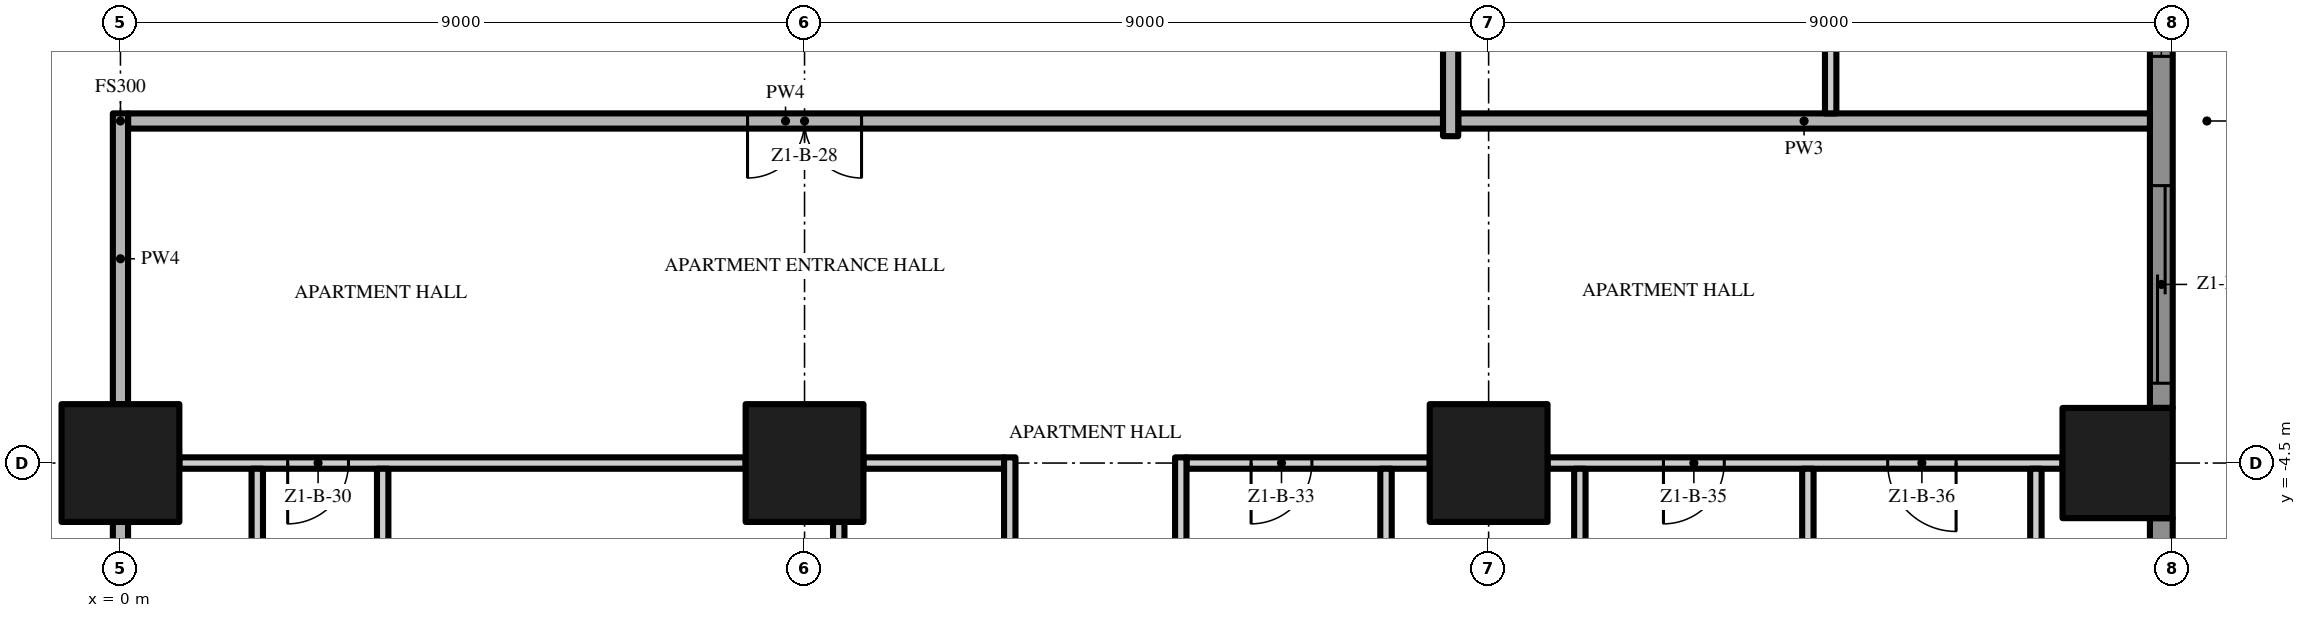
"""IFC4 building model, lengths in metres.
Left out: names, types, materials, properties, quantities, classifications, styles, units other than length and angle.
Written with IfcOpenShell. Run it as: python <this file> out.ifc"""

import sys

from ifc_helpers import new_model, si_unit, direction, frame, frame_2d, origin, origin_2d, place, context, subcontext, project, spatial, polyline, rectangle, outline, extrude, element, fill, save


model = new_model("IFC4")
c1 = context("Model", 3, precision=1e-05, world=origin(), true_north=direction((0.0, 1.0)))
c2 = subcontext(c1, "Body", "Model", "MODEL_VIEW")
j1 = project(units=[si_unit("LENGTHUNIT", "METRE"), si_unit("PLANEANGLEUNIT", "RADIAN")], contexts=[c1])
p1 = place(None, origin())
s1 = spatial("IfcSite", under=j1, at=p1, CompositionType="ELEMENT")
p2 = place(p1, origin())
s2 = spatial("IfcBuilding", under=s1, at=p2, CompositionType="ELEMENT")
p3 = place(p2, frame((0.0, 0.0, 26.4)))
s3 = spatial("IfcBuildingStorey", under=s2, at=p3, CompositionType="ELEMENT", Elevation=26.4)
for number, where, z_axis, x_axis in (
    (1, (0.0, -4.5, 0.0), (0.0, 0.0, 1.0), (1.0, 0.0, 0.0)),
    (2, (18.0, -4.5, 0.0), (0.0, 0.0, 1.0), (1.0, 0.0, 0.0)),
):
    element("IfcColumn", number, at=place(p3, frame(where, z_axis=z_axis, x_axis=x_axis)), inside=s3, PredefinedType="COLUMN", context=c2, shape_type="SweptSolid", body=[
        extrude(rectangle(XDim=1.55, YDim=1.55, at=origin_2d()), origin(), (0.0, 0.0, 1.0), 3.5),
    ])
p4 = place(p3, frame((26.275, -4.5, 0.0), z_axis=(0.0, 0.0, 1.0), x_axis=(1.0, 0.0, 0.0)))
e3 = element("IfcColumn", 3, at=p4, inside=s3, PredefinedType="COLUMN", context=c2, shape_type="SweptSolid", body=[
    extrude(rectangle(XDim=1.45, YDim=1.45, at=origin_2d()), origin(), (0.0, 0.0, 1.0), 3.5),
])
p5 = place(p3, frame((9.0, -4.5, 0.0), z_axis=(0.0, 0.0, 1.0), x_axis=(1.0, 0.0, 0.0)))
e4 = element("IfcColumn", 4, at=p5, inside=s3, PredefinedType="COLUMN", context=c2, shape_type="SweptSolid", body=[
    extrude(rectangle(XDim=1.55, YDim=1.55, at=origin_2d()), origin(), (0.0, 0.0, 1.0), 3.5),
])
p6 = place(p3, frame((26.85, -5.225, 0.0), z_axis=(0.0, 0.0, 1.0), x_axis=(0.0, -1.0, 0.0)))
e5 = element("IfcWall", 5, at=p6, inside=s3, PredefinedType="SOLIDWALL", context=c2, shape_type="SweptSolid", body=[
    extrude(rectangle(XDim=7.55, YDim=0.3, at=frame_2d((3.775, 0.0))), origin(), (0.0, 0.0, 1.0), 3.5),
])
p7 = place(p6, frame((4.625, 0.0, 0.45)))
e6 = element("IfcOpeningElement", 6, at=p7, cuts=e5, PredefinedType="OPENING", context=c2, shape_type="SweptSolid", body=[
    extrude(rectangle(XDim=2.6, YDim=2.65, at=frame_2d((1.3, 1.325))), frame((0.0, 0.16, 0.0), z_axis=(0.0, -1.0, 0.0), x_axis=(1.0, 0.0, 0.0)), (0.0, 0.0, 1.0), 0.32),
])
p8 = place(p6, frame((0.325, 0.0, 0.0)))
e7 = element("IfcOpeningElement", 7, at=p8, cuts=e5, PredefinedType="OPENING", context=c2, shape_type="SweptSolid", body=[
    extrude(rectangle(XDim=2.6, YDim=2.4, at=frame_2d((1.3, 1.2))), frame((0.0, 0.16, 0.0), z_axis=(0.0, -1.0, 0.0), x_axis=(1.0, 0.0, 0.0)), (0.0, 0.0, 1.0), 0.32),
])
p9 = place(p3, frame((26.85, 3.775, 0.0), z_axis=(0.0, 0.0, 1.0), x_axis=(0.0, -1.0, 0.0)))
e8 = element("IfcWall", 8, at=p9, inside=s3, PredefinedType="SOLIDWALL", context=c2, shape_type="SweptSolid", body=[
    extrude(rectangle(XDim=7.55, YDim=0.3, at=frame_2d((3.775, 0.0))), origin(), (0.0, 0.0, 1.0), 3.5),
])
p10 = place(p9, frame((4.625, 0.0, 0.0)))
e9 = element("IfcOpeningElement", 9, at=p10, cuts=e8, PredefinedType="OPENING", context=c2, shape_type="SweptSolid", body=[
    extrude(rectangle(XDim=2.6, YDim=2.4, at=frame_2d((1.3, 1.2))), frame((0.0, 0.16, 0.0), z_axis=(0.0, -1.0, 0.0), x_axis=(1.0, 0.0, 0.0)), (0.0, 0.0, 1.0), 0.32),
])
p11 = place(p9, frame((0.325, 0.0, 0.45)))
e10 = element("IfcOpeningElement", 10, at=p11, cuts=e8, PredefinedType="OPENING", context=c2, shape_type="SweptSolid", body=[
    extrude(rectangle(XDim=2.6, YDim=2.65, at=frame_2d((1.3, 1.325))), frame((0.0, 0.16, 0.0), z_axis=(0.0, -1.0, 0.0), x_axis=(1.0, 0.0, 0.0)), (0.0, 0.0, 1.0), 0.32),
])
p12 = place(p3, origin())
e11 = element("IfcWall", 11, at=p12, inside=s3, PredefinedType="USERDEFINED", context=c2, shape_type="SweptSolid", body=[
    extrude(outline(polyline([(29.649, -18.0), (28.988, -16.5), (28.255, -15.0), (27.731, -13.5), (27.6, -12.375), (27.615, -12.0), (27.951, -10.5), (28.612, -9.0), (29.345, -7.5), (29.869, -6.0), (30.0, -4.875), (29.985, -4.5), (29.649, -3.0), (28.988, -1.5), (28.255, 0.0), (27.731, 1.5), (27.6, 2.625), (27.615, 3.0), (27.951, 4.5), (28.612, 6.0), (29.345, 7.5), (29.869, 9.0), (30.0, 10.125), (29.985, 10.5), (29.649, 12.0), (28.988, 13.5), (28.255, 15.0), (27.731, 16.5), (27.6, 17.625), (27.615, 18.0), (27.365, 18.01), (27.349, 17.615), (27.486, 16.444), (28.024, 14.904), (28.761, 13.395), (29.41, 11.921), (29.736, 10.467), (29.749, 10.135), (29.624, 9.056), (29.114, 7.596), (28.385, 6.105), (27.713, 4.579), (27.366, 3.033), (27.349, 2.615), (27.486, 1.444), (28.024, -0.096), (28.761, -1.605), (29.41, -3.079), (29.736, -4.533), (29.749, -4.865), (29.624, -5.944), (29.114, -7.404), (28.385, -8.895), (27.713, -10.421), (27.366, -11.967), (27.349, -12.385), (27.486, -13.556), (28.024, -15.096), (28.761, -16.605), (29.42, -18.101), (29.649, -18.0)])), origin(), (0.0, 0.0, 1.0), 0.9),
])
p13 = place(p3, frame((8.225, -4.5, 0.0), z_axis=(0.0, 0.0, 1.0), x_axis=(-1.0, 0.0, 0.0)))
e12 = element("IfcWall", 12, at=p13, inside=s3, PredefinedType="PARTITIONING", context=c2, shape_type="SweptSolid", body=[
    extrude(rectangle(XDim=7.45, YDim=0.15, at=frame_2d((3.725, 0.0))), origin(), (0.0, 0.0, 1.0), 3.5),
])
p14 = place(p13, frame((5.225, 0.0, 0.0)))
e13 = element("IfcOpeningElement", 13, at=p14, cuts=e12, PredefinedType="OPENING", context=c2, shape_type="SweptSolid", body=[
    extrude(rectangle(XDim=0.8, YDim=2.0, at=frame_2d((0.4, 1.0))), frame((0.0, 0.085, 0.0), z_axis=(0.0, -1.0, 0.0), x_axis=(1.0, 0.0, 0.0)), (0.0, 0.0, 1.0), 0.17),
])
p15 = place(p3, frame((9.775, -4.5, 0.0), z_axis=(0.0, 0.0, 1.0), x_axis=(1.0, 0.0, 0.0)))
e14 = element("IfcWall", 14, at=p15, inside=s3, PredefinedType="PARTITIONING", context=c2, shape_type="SweptSolid", body=[
    extrude(rectangle(XDim=1.85, YDim=0.15, at=frame_2d((0.925, 0.0))), origin(), (0.0, 0.0, 1.0), 3.5),
])
p16 = place(p3, frame((17.225, -4.5, 0.0), z_axis=(0.0, 0.0, 1.0), x_axis=(-1.0, 0.0, 0.0)))
e15 = element("IfcWall", 15, at=p16, inside=s3, PredefinedType="PARTITIONING", context=c2, shape_type="SweptSolid", body=[
    extrude(rectangle(XDim=3.2, YDim=0.15, at=frame_2d((1.6, 0.0))), origin(), (0.0, 0.0, 1.0), 3.5),
])
p17 = place(p16, frame((1.55, 0.0, 0.0)))
e16 = element("IfcOpeningElement", 16, at=p17, cuts=e15, PredefinedType="OPENING", context=c2, shape_type="SweptSolid", body=[
    extrude(rectangle(XDim=0.8, YDim=2.0, at=frame_2d((0.4, 1.0))), frame((0.0, 0.085, 0.0), z_axis=(0.0, -1.0, 0.0), x_axis=(1.0, 0.0, 0.0)), (0.0, 0.0, 1.0), 0.17),
])
p18 = place(p3, frame((25.55, -4.5, 0.0), z_axis=(0.0, 0.0, 1.0), x_axis=(-1.0, 0.0, 0.0)))
e17 = element("IfcWall", 17, at=p18, inside=s3, PredefinedType="PARTITIONING", context=c2, shape_type="SweptSolid", body=[
    extrude(rectangle(XDim=6.775, YDim=0.15, at=frame_2d((3.388, 0.0))), origin(), (0.0, 0.0, 1.0), 3.5),
])
p19 = place(p18, frame((4.45, 0.0, 0.0)))
e18 = element("IfcOpeningElement", 18, at=p19, cuts=e17, PredefinedType="OPENING", context=c2, shape_type="SweptSolid", body=[
    extrude(rectangle(XDim=0.8, YDim=2.0, at=frame_2d((0.4, 1.0))), frame((0.0, 0.085, 0.0), z_axis=(0.0, -1.0, 0.0), x_axis=(1.0, 0.0, 0.0)), (0.0, 0.0, 1.0), 0.17),
])
p20 = place(p18, frame((1.4, 0.0, 0.0)))
e19 = element("IfcOpeningElement", 19, at=p20, cuts=e17, PredefinedType="OPENING", context=c2, shape_type="SweptSolid", body=[
    extrude(rectangle(XDim=0.9, YDim=2.1, at=frame_2d((0.45, 1.05))), frame((0.0, 0.085, 0.0), z_axis=(0.0, -1.0, 0.0), x_axis=(1.0, 0.0, 0.0)), (0.0, 0.0, 1.0), 0.17),
])
p21 = place(p3, frame((17.4, 0.0, 0.0), z_axis=(0.0, 0.0, 1.0), x_axis=(-1.0, 0.0, 0.0)))
e20 = element("IfcWall", 20, at=p21, inside=s3, PredefinedType="PARTITIONING", context=c2, shape_type="SweptSolid", body=[
    extrude(rectangle(XDim=17.3, YDim=0.2, at=frame_2d((8.65, 0.0))), origin(), (0.0, 0.0, 1.0), 3.5),
])
p22 = place(p21, frame((7.65, 0.0, 0.0)))
e21 = element("IfcOpeningElement", 21, at=p22, cuts=e20, PredefinedType="OPENING", context=c2, shape_type="SweptSolid", body=[
    extrude(rectangle(XDim=1.5, YDim=2.4, at=frame_2d((0.75, 1.2))), frame((0.0, 0.11, 0.0), z_axis=(0.0, -1.0, 0.0), x_axis=(1.0, 0.0, 0.0)), (0.0, 0.0, 1.0), 0.22),
])
p23 = place(p3, frame((17.6, 0.0, 0.0), z_axis=(0.0, 0.0, 1.0), x_axis=(1.0, 0.0, 0.0)))
e22 = element("IfcWall", 22, at=p23, inside=s3, PredefinedType="PARTITIONING", context=c2, shape_type="SweptSolid", body=[
    extrude(rectangle(XDim=9.1, YDim=0.2, at=frame_2d((4.55, 0.0))), origin(), (0.0, 0.0, 1.0), 3.5),
])
p24 = place(p3, frame((0.0, -12.725, 0.0), z_axis=(0.0, 0.0, 1.0), x_axis=(0.0, 1.0, 0.0)))
e23 = element("IfcWall", 23, at=p24, inside=s3, PredefinedType="PARTITIONING", context=c2, shape_type="SweptSolid", body=[
    extrude(rectangle(XDim=7.45, YDim=0.2, at=frame_2d((3.725, 0.0))), origin(), (0.0, 0.0, 1.0), 3.5),
])
p25 = place(p3, frame((0.0, -3.725, 0.0), z_axis=(0.0, 0.0, 1.0), x_axis=(0.0, 1.0, 0.0)))
e24 = element("IfcWall", 24, at=p25, inside=s3, PredefinedType="PARTITIONING", context=c2, shape_type="SweptSolid", body=[
    extrude(rectangle(XDim=3.825, YDim=0.2, at=frame_2d((1.913, 0.0))), origin(), (0.0, 0.0, 1.0), 3.5),
])
for number, where, z_axis, x_axis in (
    (25, (1.8, -8.925, 0.0), (0.0, 0.0, 1.0), (0.0, 1.0, 0.0)),
    (26, (3.45, -8.925, 0.0), (0.0, 0.0, 1.0), (0.0, 1.0, 0.0)),
):
    element("IfcWall", number, at=place(p3, frame(where, z_axis=z_axis, x_axis=x_axis)), inside=s3, PredefinedType="PARTITIONING", context=c2, shape_type="SweptSolid", body=[
        extrude(rectangle(XDim=4.35, YDim=0.15, at=frame_2d((2.175, 0.0))), origin(), (0.0, 0.0, 1.0), 3.5),
    ])
p26 = place(p3, frame((9.45, -8.925, 0.0), z_axis=(0.0, 0.0, 1.0), x_axis=(0.0, 1.0, 0.0)))
e27 = element("IfcWall", 27, at=p26, inside=s3, PredefinedType="PARTITIONING", context=c2, shape_type="SweptSolid", body=[
    extrude(rectangle(XDim=3.65, YDim=0.15, at=frame_2d((1.825, 0.0))), origin(), (0.0, 0.0, 1.0), 3.5),
])
p27 = place(p3, frame((11.7, -9.075, 0.0), z_axis=(0.0, 0.0, 1.0), x_axis=(0.0, 1.0, 0.0)))
e28 = element("IfcWall", 28, at=p27, inside=s3, PredefinedType="PARTITIONING", context=c2, shape_type="SweptSolid", body=[
    extrude(rectangle(XDim=4.65, YDim=0.15, at=frame_2d((2.325, 0.0))), origin(), (0.0, 0.0, 1.0), 3.5),
])
p28 = place(p27, frame((1.875, 0.0, 0.0)))
e29 = element("IfcOpeningElement", 29, at=p28, cuts=e28, PredefinedType="OPENING", context=c2, shape_type="SweptSolid", body=[
    extrude(rectangle(XDim=0.9, YDim=2.1, at=frame_2d((0.45, 1.05))), frame((0.0, 0.085, 0.0), z_axis=(0.0, -1.0, 0.0), x_axis=(1.0, 0.0, 0.0)), (0.0, 0.0, 1.0), 0.17),
])
p29 = place(p3, frame((13.95, -8.925, 0.0), z_axis=(0.0, 0.0, 1.0), x_axis=(0.0, 1.0, 0.0)))
e30 = element("IfcWall", 30, at=p29, inside=s3, PredefinedType="PARTITIONING", context=c2, shape_type="SweptSolid", body=[
    extrude(rectangle(XDim=4.5, YDim=0.15, at=frame_2d((2.25, 0.0))), origin(), (0.0, 0.0, 1.0), 3.5),
])
p30 = place(p3, frame((16.65, -8.925, 0.0), z_axis=(0.0, 0.0, 1.0), x_axis=(0.0, 1.0, 0.0)))
e31 = element("IfcWall", 31, at=p30, inside=s3, PredefinedType="PARTITIONING", context=c2, shape_type="SweptSolid", body=[
    extrude(rectangle(XDim=4.35, YDim=0.15, at=frame_2d((2.175, 0.0))), origin(), (0.0, 0.0, 1.0), 3.5),
])
p31 = place(p3, frame((17.5, -0.2, 0.0), z_axis=(0.0, 0.0, 1.0), x_axis=(0.0, 1.0, 0.0)))
e32 = element("IfcWall", 32, at=p31, inside=s3, PredefinedType="PARTITIONING", context=c2, shape_type="SweptSolid", body=[
    extrude(rectangle(XDim=3.925, YDim=0.2, at=frame_2d((1.962, 0.0))), origin(), (0.0, 0.0, 1.0), 3.5),
])
for number, where, z_axis, x_axis in (
    (33, (19.2, -8.925, 0.0), (0.0, 0.0, 1.0), (0.0, 1.0, 0.0)),
    (34, (22.2, -8.925, 0.0), (0.0, 0.0, 1.0), (0.0, 1.0, 0.0)),
):
    element("IfcWall", number, at=place(p3, frame(where, z_axis=z_axis, x_axis=x_axis)), inside=s3, PredefinedType="PARTITIONING", context=c2, shape_type="SweptSolid", body=[
        extrude(rectangle(XDim=4.35, YDim=0.15, at=frame_2d((2.175, 0.0))), origin(), (0.0, 0.0, 1.0), 3.5),
    ])
p32 = place(p3, frame((22.5, 17.275, 0.0), z_axis=(0.0, 0.0, 1.0), x_axis=(0.0, -1.0, 0.0)))
e35 = element("IfcWall", 35, at=p32, inside=s3, PredefinedType="PARTITIONING", context=c2, shape_type="SweptSolid", body=[
    extrude(rectangle(XDim=17.175, YDim=0.15, at=frame_2d((8.588, 0.0))), origin(), (0.0, 0.0, 1.0), 3.5),
])
p33 = place(p32, frame((14.525, 0.0, 0.0)))
e36 = element("IfcOpeningElement", 36, at=p33, cuts=e35, PredefinedType="OPENING", context=c2, shape_type="SweptSolid", body=[
    extrude(rectangle(XDim=1.0, YDim=2.4, at=frame_2d((0.5, 1.2))), frame((0.0, 0.085, 0.0), z_axis=(0.0, -1.0, 0.0), x_axis=(1.0, 0.0, 0.0)), (0.0, 0.0, 1.0), 0.17),
])
p34 = place(p32, frame((8.925, 0.0, 0.0)))
e37 = element("IfcOpeningElement", 37, at=p34, cuts=e35, PredefinedType="OPENING", context=c2, shape_type="SweptSolid", body=[
    extrude(rectangle(XDim=1.0, YDim=2.4, at=frame_2d((0.5, 1.2))), frame((0.0, 0.085, 0.0), z_axis=(0.0, -1.0, 0.0), x_axis=(1.0, 0.0, 0.0)), (0.0, 0.0, 1.0), 0.17),
])
p35 = place(p32, frame((3.975, 0.0, 0.0)))
e38 = element("IfcOpeningElement", 38, at=p35, cuts=e35, PredefinedType="OPENING", context=c2, shape_type="SweptSolid", body=[
    extrude(rectangle(XDim=1.8, YDim=2.4, at=frame_2d((0.9, 1.2))), frame((0.0, 0.085, 0.0), z_axis=(0.0, -1.0, 0.0), x_axis=(1.0, 0.0, 0.0)), (0.0, 0.0, 1.0), 0.17),
])
p36 = place(p3, frame((25.2, -8.925, 0.0), z_axis=(0.0, 0.0, 1.0), x_axis=(0.0, 1.0, 0.0)))
e39 = element("IfcWall", 39, at=p36, inside=s3, PredefinedType="PARTITIONING", context=c2, shape_type="SweptSolid", body=[
    extrude(rectangle(XDim=4.35, YDim=0.15, at=frame_2d((2.175, 0.0))), origin(), (0.0, 0.0, 1.0), 3.5),
])
p37 = place(p10, origin())
e40 = element("IfcDoor", 40, at=p37, inside=s3, OperationType="SINGLE_SWING_LEFT", PredefinedType="DOOR", context=c2, shape_type="SweptSolid", body=[
    extrude(rectangle(XDim=2.6, YDim=2.4, at=frame_2d((1.3, 1.2))), frame((0.0, 0.025, 0.0), z_axis=(0.0, -1.0, 0.0), x_axis=(1.0, 0.0, 0.0)), (0.0, 0.0, 1.0), 0.05),
])
fill(e9, e40)
p38 = place(p11, origin())
e41 = element("IfcWindow", 41, at=p38, inside=s3, PartitioningType="SINGLE_PANEL", PredefinedType="WINDOW", context=c2, shape_type="SweptSolid", body=[
    extrude(rectangle(XDim=2.6, YDim=2.65, at=frame_2d((1.3, 1.325))), frame((0.0, 0.03, 0.0), z_axis=(0.0, -1.0, 0.0), x_axis=(1.0, 0.0, 0.0)), (0.0, 0.0, 1.0), 0.06),
])
fill(e10, e41)
p39 = place(p22, origin())
e42 = element("IfcDoor", 42, at=p39, inside=s3, OperationType="DOUBLE_DOOR_SINGLE_SWING", PredefinedType="DOOR", context=c2, shape_type="SweptSolid", body=[
    extrude(rectangle(XDim=1.5, YDim=2.4, at=frame_2d((0.75, 1.2))), frame((0.0, 0.025, 0.0), z_axis=(0.0, -1.0, 0.0), x_axis=(1.0, 0.0, 0.0)), (0.0, 0.0, 1.0), 0.05),
])
fill(e21, e42)
p40 = place(p14, origin())
e43 = element("IfcDoor", 43, at=p40, inside=s3, OperationType="SINGLE_SWING_RIGHT", PredefinedType="DOOR", context=c2, shape_type="SweptSolid", body=[
    extrude(rectangle(XDim=0.8, YDim=2.0, at=frame_2d((0.4, 1.0))), frame((0.0, 0.025, 0.0), z_axis=(0.0, -1.0, 0.0), x_axis=(1.0, 0.0, 0.0)), (0.0, 0.0, 1.0), 0.05),
])
fill(e13, e43)
p41 = place(p17, origin())
e44 = element("IfcDoor", 44, at=p41, inside=s3, OperationType="SINGLE_SWING_RIGHT", PredefinedType="DOOR", context=c2, shape_type="SweptSolid", body=[
    extrude(rectangle(XDim=0.8, YDim=2.0, at=frame_2d((0.4, 1.0))), frame((0.0, 0.025, 0.0), z_axis=(0.0, -1.0, 0.0), x_axis=(1.0, 0.0, 0.0)), (0.0, 0.0, 1.0), 0.05),
])
fill(e16, e44)
p42 = place(p19, origin())
e45 = element("IfcDoor", 45, at=p42, inside=s3, OperationType="SINGLE_SWING_RIGHT", PredefinedType="DOOR", context=c2, shape_type="SweptSolid", body=[
    extrude(rectangle(XDim=0.8, YDim=2.0, at=frame_2d((0.4, 1.0))), frame((0.0, 0.025, 0.0), z_axis=(0.0, -1.0, 0.0), x_axis=(1.0, 0.0, 0.0)), (0.0, 0.0, 1.0), 0.05),
])
fill(e18, e45)
p43 = place(p20, origin())
e46 = element("IfcDoor", 46, at=p43, inside=s3, OperationType="SINGLE_SWING_LEFT", PredefinedType="DOOR", context=c2, shape_type="SweptSolid", body=[
    extrude(rectangle(XDim=0.9, YDim=2.1, at=frame_2d((0.45, 1.05))), frame((0.0, 0.025, 0.0), z_axis=(0.0, -1.0, 0.0), x_axis=(1.0, 0.0, 0.0)), (0.0, 0.0, 1.0), 0.05),
])
fill(e19, e46)
save(model, sys.argv[1])
